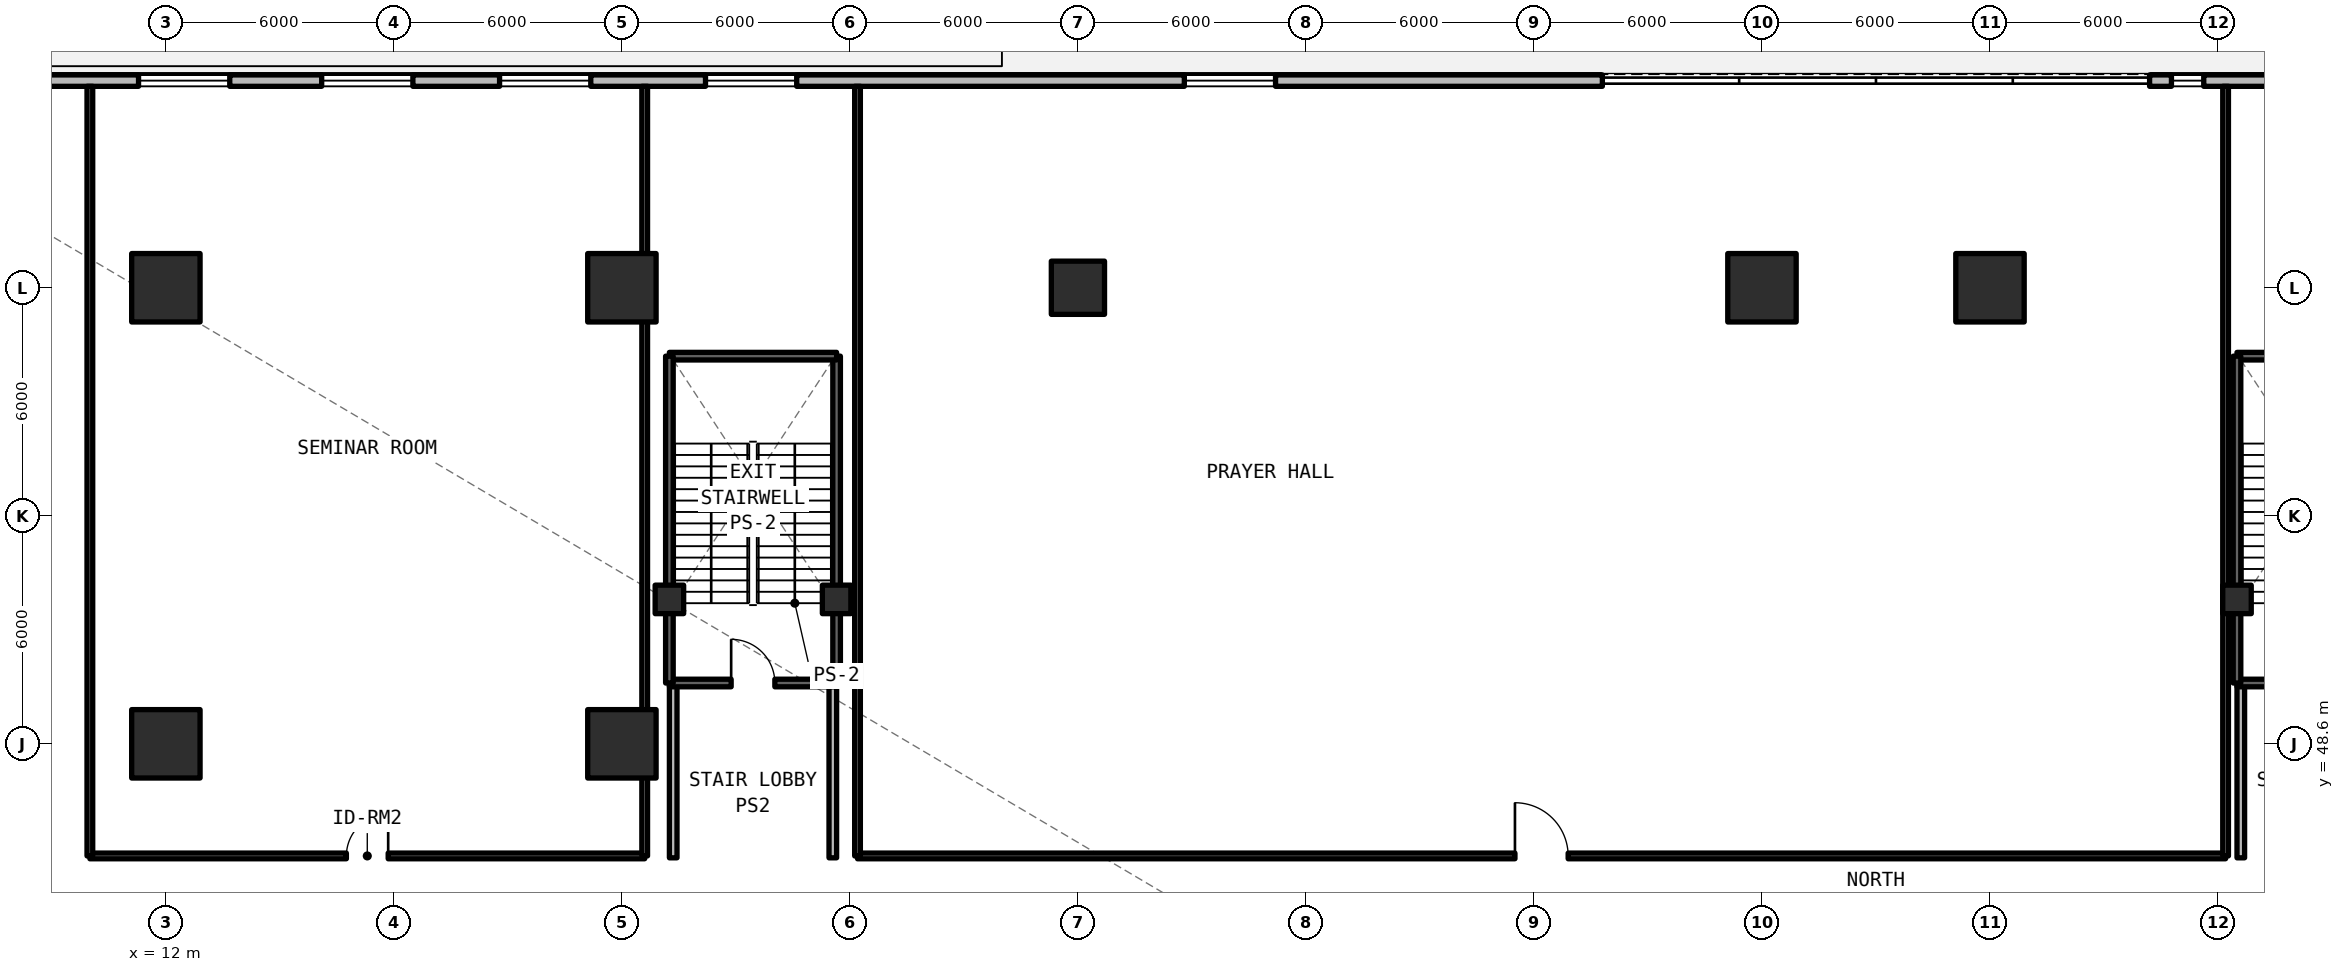
"""IFC4 building model, lengths in metres.
Left out: names, types, materials, properties, quantities, classifications, styles, units other than length and angle.
Written with IfcOpenShell. Run it as: python <this file> out.ifc"""

import sys

from ifc_helpers import new_model, si_unit, direction, frame, frame_2d, origin, origin_2d, place, context, subcontext, project, spatial, rectangle, circle, extrude, element, fill, save


model = new_model("IFC4")
c1 = context("Model", 3, precision=1e-05, world=origin(), true_north=direction((0.0, 1.0)))
c2 = subcontext(c1, "Body", "Model", "MODEL_VIEW")
j1 = project(units=[si_unit("LENGTHUNIT", "METRE"), si_unit("PLANEANGLEUNIT", "RADIAN")], contexts=[c1])
p1 = place(None, origin())
s1 = spatial("IfcSite", under=j1, at=p1, CompositionType="ELEMENT")
p2 = place(p1, origin())
s2 = spatial("IfcBuilding", under=s1, at=p2, CompositionType="ELEMENT")
p3 = place(p2, frame((0.0, 0.0, 4.95)))
s3 = spatial("IfcBuildingStorey", under=s2, at=p3, CompositionType="ELEMENT", Elevation=4.95)
for number, where, z_axis, x_axis in (
    (1, (12.0, 60.6, 0.0), (0.0, 0.0, 1.0), (1.0, 0.0, 0.0)),
    (2, (24.0, 60.6, 0.0), (0.0, 0.0, 1.0), (1.0, 0.0, 0.0)),
):
    element("IfcColumn", number, at=place(p3, frame(where, z_axis=z_axis, x_axis=x_axis)), inside=s3, PredefinedType="COLUMN", context=c2, shape_type="SweptSolid", body=[
        extrude(rectangle(XDim=1.8, YDim=1.8, at=origin_2d()), origin(), (0.0, 0.0, 1.0), 4.95),
    ])
p4 = place(p3, frame((36.0, 60.6, 0.0), z_axis=(0.0, 0.0, 1.0), x_axis=(1.0, 0.0, 0.0)))
e3 = element("IfcColumn", 3, at=p4, inside=s3, PredefinedType="COLUMN", context=c2, shape_type="SweptSolid", body=[
    extrude(circle(Radius=0.7, at=origin_2d()), origin(), (0.0, 0.0, 1.0), 4.95),
])
for number, where, z_axis, x_axis in (
    (4, (54.0, 60.6, 0.0), (0.0, 0.0, 1.0), (1.0, 0.0, 0.0)),
    (5, (60.0, 60.6, 0.0), (0.0, 0.0, 1.0), (1.0, 0.0, 0.0)),
    (6, (12.0, 48.6, 0.0), (0.0, 0.0, 1.0), (1.0, 0.0, 0.0)),
    (7, (24.0, 48.6, 0.0), (0.0, 0.0, 1.0), (1.0, 0.0, 0.0)),
):
    element("IfcColumn", number, at=place(p3, frame(where, z_axis=z_axis, x_axis=x_axis)), inside=s3, PredefinedType="COLUMN", context=c2, shape_type="SweptSolid", body=[
        extrude(rectangle(XDim=1.8, YDim=1.8, at=origin_2d()), origin(), (0.0, 0.0, 1.0), 4.95),
    ])
for number, where, z_axis, x_axis in (
    (8, (25.25, 52.4, 0.0), (0.0, 0.0, 1.0), (1.0, 0.0, 0.0)),
    (9, (29.65, 52.4, 0.0), (0.0, 0.0, 1.0), (1.0, 0.0, 0.0)),
    (10, (66.5, 52.4, 0.0), (0.0, 0.0, 1.0), (1.0, 0.0, 0.0)),
):
    element("IfcColumn", number, at=place(p3, frame(where, z_axis=z_axis, x_axis=x_axis)), inside=s3, PredefinedType="COLUMN", context=c2, shape_type="SweptSolid", body=[
        extrude(rectangle(XDim=0.75, YDim=0.75, at=origin_2d()), origin(), (0.0, 0.0, 1.0), 4.95),
    ])
p5 = place(p3, frame((110.338, 66.05, 0.0), z_axis=(0.0, 0.0, 1.0), x_axis=(-1.0, 0.0, 0.0)))
e11 = element("IfcWall", 11, at=p5, inside=s3, PredefinedType="SOLIDWALL", context=c2, shape_type="SweptSolid", body=[
    extrude(rectangle(XDim=46.138, YDim=0.3, at=frame_2d((23.069, 0.0))), origin(), (0.0, 0.0, 1.0), 4.67),
])
p6 = place(p5, frame((7.75, 0.0, 0.0)))
e12 = element("IfcOpeningElement", 12, at=p6, cuts=e11, PredefinedType="OPENING", context=c2, shape_type="SweptSolid", body=[
    extrude(rectangle(XDim=1.5, YDim=2.2, at=frame_2d((0.75, 1.1))), frame((0.0, 0.16, 0.0), z_axis=(0.0, -1.0, 0.0), x_axis=(1.0, 0.0, 0.0)), (0.0, 0.0, 1.0), 0.32),
])
p7 = place(p5, frame((44.713, 0.0, 0.78)))
e13 = element("IfcOpeningElement", 13, at=p7, cuts=e11, PredefinedType="OPENING", context=c2, shape_type="SweptSolid", body=[
    extrude(rectangle(XDim=0.85, YDim=1.65, at=frame_2d((0.425, 0.825))), frame((0.0, 0.16, 0.0), z_axis=(0.0, -1.0, 0.0), x_axis=(1.0, 0.0, 0.0)), (0.0, 0.0, 1.0), 0.32),
])
p8 = place(p5, frame((31.538, 0.0, 0.78)))
e14 = element("IfcOpeningElement", 14, at=p8, cuts=e11, PredefinedType="OPENING", context=c2, shape_type="SweptSolid", body=[
    extrude(rectangle(XDim=2.4, YDim=1.66, at=frame_2d((1.2, 0.83))), frame((0.0, 0.16, 0.0), z_axis=(0.0, -1.0, 0.0), x_axis=(1.0, 0.0, 0.0)), (0.0, 0.0, 1.0), 0.32),
])
p9 = place(p5, frame((2.194, 0.0, 0.78)))
e15 = element("IfcOpeningElement", 15, at=p9, cuts=e11, PredefinedType="OPENING", context=c2, shape_type="SweptSolid", body=[
    extrude(rectangle(XDim=2.4, YDim=1.66, at=frame_2d((1.2, 0.83))), frame((0.0, 0.16, 0.0), z_axis=(0.0, -1.0, 0.0), x_axis=(1.0, 0.0, 0.0)), (0.0, 0.0, 1.0), 0.32),
])
p10 = place(p5, frame((40.438, 0.0, 0.78)))
e16 = element("IfcOpeningElement", 16, at=p10, cuts=e11, PredefinedType="OPENING", context=c2, shape_type="SweptSolid", body=[
    extrude(rectangle(XDim=2.4, YDim=1.66, at=frame_2d((1.2, 0.83))), frame((0.0, 0.16, 0.0), z_axis=(0.0, -1.0, 0.0), x_axis=(1.0, 0.0, 0.0)), (0.0, 0.0, 1.0), 0.32),
])
p11 = place(p5, frame((17.119, 0.0, 0.78)))
e17 = element("IfcOpeningElement", 17, at=p11, cuts=e11, PredefinedType="OPENING", context=c2, shape_type="SweptSolid", body=[
    extrude(rectangle(XDim=2.4, YDim=1.66, at=frame_2d((1.2, 0.83))), frame((0.0, 0.16, 0.0), z_axis=(0.0, -1.0, 0.0), x_axis=(1.0, 0.0, 0.0)), (0.0, 0.0, 1.0), 0.32),
])
p12 = place(p5, frame((36.119, 0.0, 0.78)))
e18 = element("IfcOpeningElement", 18, at=p12, cuts=e11, PredefinedType="OPENING", context=c2, shape_type="SweptSolid", body=[
    extrude(rectangle(XDim=2.4, YDim=1.66, at=frame_2d((1.2, 0.83))), frame((0.0, 0.16, 0.0), z_axis=(0.0, -1.0, 0.0), x_axis=(1.0, 0.0, 0.0)), (0.0, 0.0, 1.0), 0.32),
])
p13 = place(p3, frame((49.8, 66.05, 0.0), z_axis=(0.0, 0.0, 1.0), x_axis=(-1.0, 0.0, 0.0)))
e19 = element("IfcWall", 19, at=p13, inside=s3, PredefinedType="SOLIDWALL", context=c2, shape_type="SweptSolid", body=[
    extrude(rectangle(XDim=46.138, YDim=0.3, at=frame_2d((23.069, 0.0))), origin(), (0.0, 0.0, 1.0), 4.67),
])
p14 = place(p13, frame((8.6, 0.0, 0.78)))
e20 = element("IfcOpeningElement", 20, at=p14, cuts=e19, PredefinedType="OPENING", context=c2, shape_type="SweptSolid", body=[
    extrude(rectangle(XDim=2.4, YDim=1.66, at=frame_2d((1.2, 0.83))), frame((0.0, 0.16, 0.0), z_axis=(0.0, -1.0, 0.0), x_axis=(1.0, 0.0, 0.0)), (0.0, 0.0, 1.0), 0.32),
])
p15 = place(p13, frame((31.3, 0.0, 0.78)))
e21 = element("IfcOpeningElement", 21, at=p15, cuts=e19, PredefinedType="OPENING", context=c2, shape_type="SweptSolid", body=[
    extrude(rectangle(XDim=2.4, YDim=1.66, at=frame_2d((1.2, 0.83))), frame((0.0, 0.16, 0.0), z_axis=(0.0, -1.0, 0.0), x_axis=(1.0, 0.0, 0.0)), (0.0, 0.0, 1.0), 0.32),
])
p16 = place(p13, frame((21.2, 0.0, 0.78)))
e22 = element("IfcOpeningElement", 22, at=p16, cuts=e19, PredefinedType="OPENING", context=c2, shape_type="SweptSolid", body=[
    extrude(rectangle(XDim=2.4, YDim=1.66, at=frame_2d((1.2, 0.83))), frame((0.0, 0.16, 0.0), z_axis=(0.0, -1.0, 0.0), x_axis=(1.0, 0.0, 0.0)), (0.0, 0.0, 1.0), 0.32),
])
p17 = place(p13, frame((41.769, 0.0, 0.78)))
e23 = element("IfcOpeningElement", 23, at=p17, cuts=e19, PredefinedType="OPENING", context=c2, shape_type="SweptSolid", body=[
    extrude(rectangle(XDim=2.4, YDim=1.66, at=frame_2d((1.2, 0.83))), frame((0.0, 0.16, 0.0), z_axis=(0.0, -1.0, 0.0), x_axis=(1.0, 0.0, 0.0)), (0.0, 0.0, 1.0), 0.32),
])
p18 = place(p13, frame((26.619, 0.0, 0.78)))
e24 = element("IfcOpeningElement", 24, at=p18, cuts=e19, PredefinedType="OPENING", context=c2, shape_type="SweptSolid", body=[
    extrude(rectangle(XDim=2.4, YDim=1.66, at=frame_2d((1.2, 0.83))), frame((0.0, 0.16, 0.0), z_axis=(0.0, -1.0, 0.0), x_axis=(1.0, 0.0, 0.0)), (0.0, 0.0, 1.0), 0.32),
])
p19 = place(p13, frame((36.119, 0.0, 0.78)))
e25 = element("IfcOpeningElement", 25, at=p19, cuts=e19, PredefinedType="OPENING", context=c2, shape_type="SweptSolid", body=[
    extrude(rectangle(XDim=2.4, YDim=1.66, at=frame_2d((1.2, 0.83))), frame((0.0, 0.16, 0.0), z_axis=(0.0, -1.0, 0.0), x_axis=(1.0, 0.0, 0.0)), (0.0, 0.0, 1.0), 0.32),
])
for number, where, z_axis, x_axis in (
    (26, (25.35, 45.6, 0.0), (0.0, 0.0, 1.0), (0.0, 1.0, 0.0)),
    (27, (29.55, 45.6, 0.0), (0.0, 0.0, 1.0), (0.0, 1.0, 0.0)),
    (28, (66.6, 45.6, 0.0), (0.0, 0.0, 1.0), (0.0, 1.0, 0.0)),
):
    element("IfcWall", number, at=place(p3, frame(where, z_axis=z_axis, x_axis=x_axis)), inside=s3, PredefinedType="SOLIDWALL", context=c2, shape_type="SweptSolid", body=[
        extrude(rectangle(XDim=4.6, YDim=0.2, at=frame_2d((2.3, 0.0))), origin(), (0.0, 0.0, 1.0), 3.89),
    ])
p20 = place(p3, frame((30.2, 45.65, 0.0), z_axis=(0.0, 0.0, 1.0), x_axis=(1.0, 0.0, 0.0)))
e29 = element("IfcWall", 29, at=p20, inside=s3, PredefinedType="SOLIDWALL", context=c2, shape_type="SweptSolid", body=[
    extrude(rectangle(XDim=36.0, YDim=0.15, at=frame_2d((18.0, 0.0))), origin(), (0.0, 0.0, 1.0), 3.89),
])
p21 = place(p20, frame((17.3, 0.0, 0.0)))
e30 = element("IfcOpeningElement", 30, at=p21, cuts=e29, PredefinedType="OPENING", context=c2, shape_type="SweptSolid", body=[
    extrude(rectangle(XDim=1.4, YDim=2.15, at=frame_2d((0.7, 1.075))), frame((0.0, 0.085, 0.0), z_axis=(0.0, -1.0, 0.0), x_axis=(1.0, 0.0, 0.0)), (0.0, 0.0, 1.0), 0.17),
])
for number, where, z_axis, x_axis in (
    (31, (30.2, 45.65, 0.0), (0.0, 0.0, 1.0), (0.0, 1.0, 0.0)),
    (32, (66.2, 45.65, 0.0), (0.0, 0.0, 1.0), (0.0, 1.0, 0.0)),
):
    element("IfcWall", number, at=place(p3, frame(where, z_axis=z_axis, x_axis=x_axis)), inside=s3, PredefinedType="SOLIDWALL", context=c2, shape_type="SweptSolid", body=[
        extrude(rectangle(XDim=20.25, YDim=0.15, at=frame_2d((10.125, 0.0))), origin(), (0.0, 0.0, 1.0), 3.89),
    ])
p22 = place(p3, frame((10.0, 45.65, 0.0), z_axis=(0.0, 0.0, 1.0), x_axis=(1.0, 0.0, 0.0)))
e33 = element("IfcWall", 33, at=p22, inside=s3, PredefinedType="SOLIDWALL", context=c2, shape_type="SweptSolid", body=[
    extrude(rectangle(XDim=14.6, YDim=0.15, at=frame_2d((7.3, 0.0))), origin(), (0.0, 0.0, 1.0), 3.89),
])
p23 = place(p22, frame((6.75, 0.0, 0.0)))
e34 = element("IfcOpeningElement", 34, at=p23, cuts=e33, PredefinedType="OPENING", context=c2, shape_type="SweptSolid", body=[
    extrude(rectangle(XDim=1.1, YDim=2.15, at=frame_2d((0.55, 1.075))), frame((0.0, 0.085, 0.0), z_axis=(0.0, -1.0, 0.0), x_axis=(1.0, 0.0, 0.0)), (0.0, 0.0, 1.0), 0.17),
])
for number, where, z_axis, x_axis in (
    (35, (10.0, 45.65, 0.0), (0.0, 0.0, 1.0), (0.0, 1.0, 0.0)),
    (36, (24.6, 45.65, 0.0), (0.0, 0.0, 1.0), (0.0, 1.0, 0.0)),
):
    element("IfcWall", number, at=place(p3, frame(where, z_axis=z_axis, x_axis=x_axis)), inside=s3, PredefinedType="SOLIDWALL", context=c2, shape_type="SweptSolid", body=[
        extrude(rectangle(XDim=20.25, YDim=0.15, at=frame_2d((10.125, 0.0))), origin(), (0.0, 0.0, 1.0), 3.89),
    ])
p24 = place(p3, frame((25.25, 50.2, 0.0), z_axis=(0.0, 0.0, 1.0), x_axis=(1.0, 0.0, 0.0)))
e37 = element("IfcWall", 37, at=p24, inside=s3, PredefinedType="SOLIDWALL", context=c2, shape_type="SweptSolid", body=[
    extrude(rectangle(XDim=4.4, YDim=0.2, at=frame_2d((2.2, 0.0))), origin(), (0.0, 0.0, 1.0), 4.95),
])
p25 = place(p24, frame((1.625, 0.0, 0.0)))
e38 = element("IfcOpeningElement", 38, at=p25, cuts=e37, PredefinedType="OPENING", context=c2, shape_type="SweptSolid", body=[
    extrude(rectangle(XDim=1.15, YDim=2.15, at=frame_2d((0.575, 1.075))), frame((0.0, 0.11, 0.0), z_axis=(0.0, -1.0, 0.0), x_axis=(1.0, 0.0, 0.0)), (0.0, 0.0, 1.0), 0.22),
])
p26 = place(p3, frame((29.65, 50.2, 0.0), z_axis=(0.0, 0.0, 1.0), x_axis=(0.0, 1.0, 0.0)))
e39 = element("IfcWall", 39, at=p26, inside=s3, PredefinedType="SOLIDWALL", context=c2, shape_type="SweptSolid", body=[
    extrude(rectangle(XDim=8.6, YDim=0.2, at=frame_2d((4.3, 0.0))), origin(), (0.0, 0.0, 1.0), 4.95),
])
p27 = place(p3, frame((29.65, 58.8, 0.0), z_axis=(0.0, 0.0, 1.0), x_axis=(-1.0, 0.0, 0.0)))
e40 = element("IfcWall", 40, at=p27, inside=s3, PredefinedType="SOLIDWALL", context=c2, shape_type="SweptSolid", body=[
    extrude(rectangle(XDim=4.4, YDim=0.2, at=frame_2d((2.2, 0.0))), origin(), (0.0, 0.0, 1.0), 4.95),
])
p28 = place(p3, frame((25.25, 58.8, 0.0), z_axis=(0.0, 0.0, 1.0), x_axis=(0.0, -1.0, 0.0)))
e41 = element("IfcWall", 41, at=p28, inside=s3, PredefinedType="SOLIDWALL", context=c2, shape_type="SweptSolid", body=[
    extrude(rectangle(XDim=8.6, YDim=0.2, at=frame_2d((4.3, 0.0))), origin(), (0.0, 0.0, 1.0), 4.95),
])
p29 = place(p3, frame((66.5, 50.2, 0.0), z_axis=(0.0, 0.0, 1.0), x_axis=(1.0, 0.0, 0.0)))
e42 = element("IfcWall", 42, at=p29, inside=s3, PredefinedType="SOLIDWALL", context=c2, shape_type="SweptSolid", body=[
    extrude(rectangle(XDim=4.4, YDim=0.2, at=frame_2d((2.2, 0.0))), origin(), (0.0, 0.0, 1.0), 4.95),
])
p30 = place(p29, frame((1.625, 0.0, 0.0)))
e43 = element("IfcOpeningElement", 43, at=p30, cuts=e42, PredefinedType="OPENING", context=c2, shape_type="SweptSolid", body=[
    extrude(rectangle(XDim=1.15, YDim=2.15, at=frame_2d((0.575, 1.075))), frame((0.0, 0.11, 0.0), z_axis=(0.0, -1.0, 0.0), x_axis=(1.0, 0.0, 0.0)), (0.0, 0.0, 1.0), 0.22),
])
p31 = place(p3, frame((70.9, 58.8, 0.0), z_axis=(0.0, 0.0, 1.0), x_axis=(-1.0, 0.0, 0.0)))
e44 = element("IfcWall", 44, at=p31, inside=s3, PredefinedType="SOLIDWALL", context=c2, shape_type="SweptSolid", body=[
    extrude(rectangle(XDim=4.4, YDim=0.2, at=frame_2d((2.2, 0.0))), origin(), (0.0, 0.0, 1.0), 4.95),
])
p32 = place(p3, frame((66.5, 58.8, 0.0), z_axis=(0.0, 0.0, 1.0), x_axis=(0.0, -1.0, 0.0)))
e45 = element("IfcWall", 45, at=p32, inside=s3, PredefinedType="SOLIDWALL", context=c2, shape_type="SweptSolid", body=[
    extrude(rectangle(XDim=8.6, YDim=0.2, at=frame_2d((4.3, 0.0))), origin(), (0.0, 0.0, 1.0), 4.95),
])
p33 = place(p7, origin())
e46 = element("IfcWindow", 46, at=p33, inside=s3, PartitioningType="SINGLE_PANEL", PredefinedType="WINDOW", context=c2, shape_type="SweptSolid", body=[
    extrude(rectangle(XDim=0.85, YDim=1.65, at=frame_2d((0.425, 0.825))), frame((0.0, 0.03, 0.0), z_axis=(0.0, -1.0, 0.0), x_axis=(1.0, 0.0, 0.0)), (0.0, 0.0, 1.0), 0.06),
])
fill(e13, e46)
p34 = place(p14, origin())
e47 = element("IfcWindow", 47, at=p34, inside=s3, PartitioningType="SINGLE_PANEL", PredefinedType="WINDOW", context=c2, shape_type="SweptSolid", body=[
    extrude(rectangle(XDim=2.4, YDim=1.66, at=frame_2d((1.2, 0.83))), frame((0.0, 0.03, 0.0), z_axis=(0.0, -1.0, 0.0), x_axis=(1.0, 0.0, 0.0)), (0.0, 0.0, 1.0), 0.06),
])
fill(e20, e47)
p35 = place(p15, origin())
e48 = element("IfcWindow", 48, at=p35, inside=s3, PartitioningType="SINGLE_PANEL", PredefinedType="WINDOW", context=c2, shape_type="SweptSolid", body=[
    extrude(rectangle(XDim=2.4, YDim=1.66, at=frame_2d((1.2, 0.83))), frame((0.0, 0.03, 0.0), z_axis=(0.0, -1.0, 0.0), x_axis=(1.0, 0.0, 0.0)), (0.0, 0.0, 1.0), 0.06),
])
fill(e21, e48)
p36 = place(p16, origin())
e49 = element("IfcWindow", 49, at=p36, inside=s3, PartitioningType="SINGLE_PANEL", PredefinedType="WINDOW", context=c2, shape_type="SweptSolid", body=[
    extrude(rectangle(XDim=2.4, YDim=1.66, at=frame_2d((1.2, 0.83))), frame((0.0, 0.03, 0.0), z_axis=(0.0, -1.0, 0.0), x_axis=(1.0, 0.0, 0.0)), (0.0, 0.0, 1.0), 0.06),
])
fill(e22, e49)
p37 = place(p18, origin())
e50 = element("IfcWindow", 50, at=p37, inside=s3, PartitioningType="SINGLE_PANEL", PredefinedType="WINDOW", context=c2, shape_type="SweptSolid", body=[
    extrude(rectangle(XDim=2.4, YDim=1.66, at=frame_2d((1.2, 0.83))), frame((0.0, 0.03, 0.0), z_axis=(0.0, -1.0, 0.0), x_axis=(1.0, 0.0, 0.0)), (0.0, 0.0, 1.0), 0.06),
])
fill(e24, e50)
p38 = place(p19, origin())
e51 = element("IfcWindow", 51, at=p38, inside=s3, PartitioningType="SINGLE_PANEL", PredefinedType="WINDOW", context=c2, shape_type="SweptSolid", body=[
    extrude(rectangle(XDim=2.4, YDim=1.66, at=frame_2d((1.2, 0.83))), frame((0.0, 0.03, 0.0), z_axis=(0.0, -1.0, 0.0), x_axis=(1.0, 0.0, 0.0)), (0.0, 0.0, 1.0), 0.06),
])
fill(e25, e51)
p39 = place(p21, origin())
e52 = element("IfcDoor", 52, at=p39, inside=s3, OperationType="SINGLE_SWING_LEFT", PredefinedType="DOOR", context=c2, shape_type="SweptSolid", body=[
    extrude(rectangle(XDim=1.4, YDim=2.15, at=frame_2d((0.7, 1.075))), frame((0.0, 0.025, 0.0), z_axis=(0.0, -1.0, 0.0), x_axis=(1.0, 0.0, 0.0)), (0.0, 0.0, 1.0), 0.05),
])
fill(e30, e52)
p40 = place(p23, origin())
e53 = element("IfcDoor", 53, at=p40, inside=s3, OperationType="SINGLE_SWING_RIGHT", PredefinedType="DOOR", context=c2, shape_type="SweptSolid", body=[
    extrude(rectangle(XDim=1.1, YDim=2.15, at=frame_2d((0.55, 1.075))), frame((0.0, 0.025, 0.0), z_axis=(0.0, -1.0, 0.0), x_axis=(1.0, 0.0, 0.0)), (0.0, 0.0, 1.0), 0.05),
])
fill(e34, e53)
p41 = place(p25, origin())
e54 = element("IfcDoor", 54, at=p41, inside=s3, OperationType="SINGLE_SWING_LEFT", PredefinedType="DOOR", context=c2, shape_type="SweptSolid", body=[
    extrude(rectangle(XDim=1.15, YDim=2.15, at=frame_2d((0.575, 1.075))), frame((0.0, 0.025, 0.0), z_axis=(0.0, -1.0, 0.0), x_axis=(1.0, 0.0, 0.0)), (0.0, 0.0, 1.0), 0.05),
])
fill(e38, e54)
save(model, sys.argv[1])
